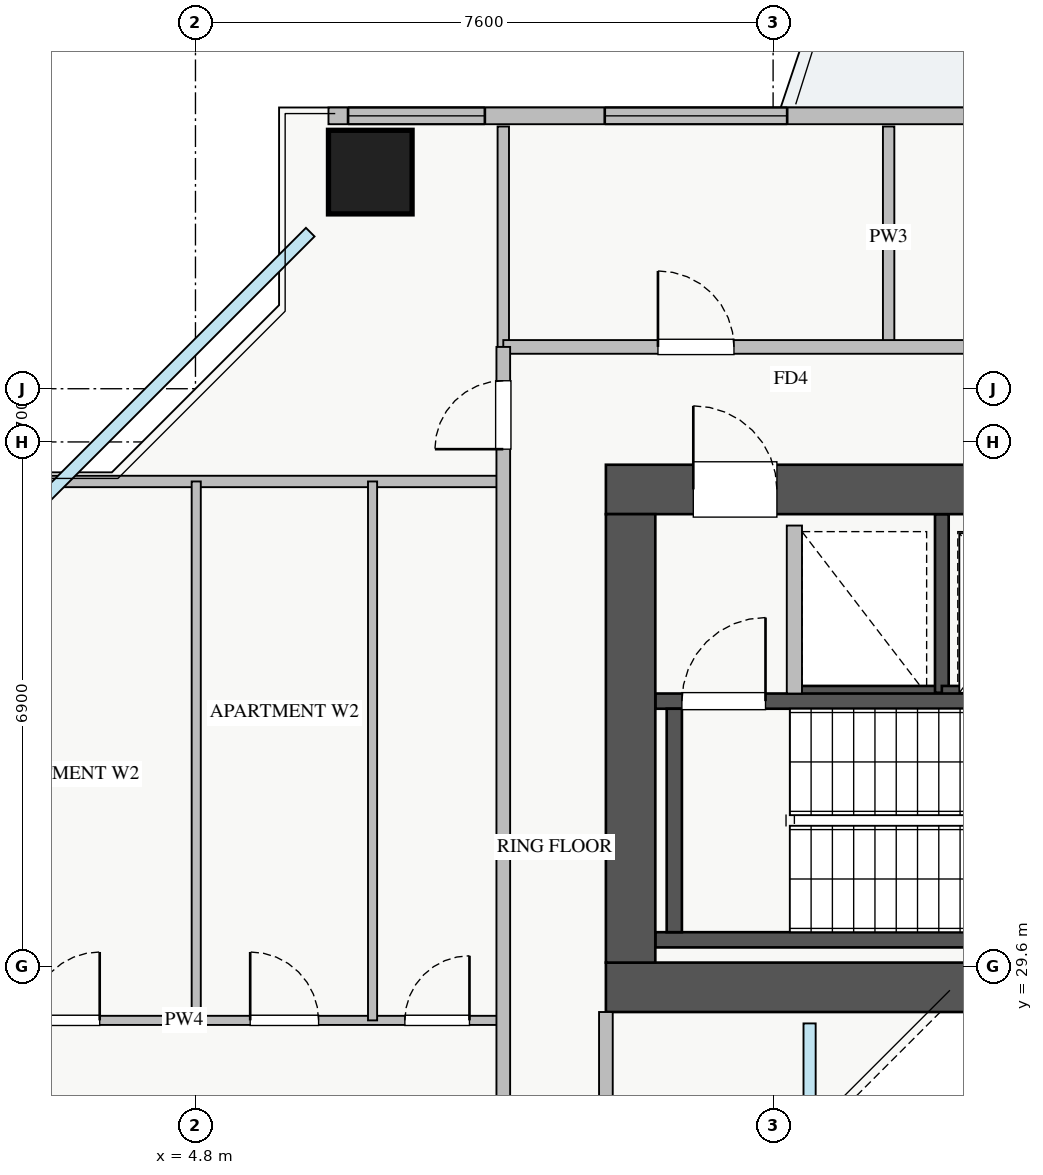
"""IFC4 building model, lengths in metres.
Left out: names, types, materials, properties, quantities, classifications, styles, units other than length and angle.
Written with IfcOpenShell. Run it as: python <this file> out.ifc"""

import sys

from ifc_helpers import new_model, si_unit, direction, frame, frame_2d, origin, origin_2d, place, context, subcontext, project, spatial, rectangle, extrude, source, transform, mapped, element, fill, save


model = new_model("IFC4")
c1 = context("Model", 3, precision=1e-05, world=origin(), true_north=direction((0.0, 1.0)))
c2 = subcontext(c1, "Body", "Model", "MODEL_VIEW")
j1 = project(units=[si_unit("LENGTHUNIT", "METRE"), si_unit("PLANEANGLEUNIT", "RADIAN")], contexts=[c1])
p1 = place(None, origin())
s1 = spatial("IfcSite", under=j1, at=p1, CompositionType="ELEMENT")
p2 = place(p1, origin())
s2 = spatial("IfcBuilding", under=s1, at=p2, CompositionType="ELEMENT")
p3 = place(p2, frame((0.0, 0.0, 119.75)))
s3 = spatial("IfcBuildingStorey", under=s2, at=p3, CompositionType="ELEMENT", Elevation=119.75)
p4 = place(p3, frame((12.68, 33.2, 0.0), z_axis=(0.0, 0.0, 1.0), x_axis=(1.0, 0.0, 0.0)))
e1 = element("IfcWall", 1, at=p4, inside=s3, PredefinedType="SHEAR", context=c2, shape_type="SweptSolid", body=[
    extrude(rectangle(XDim=1.94, YDim=0.18, at=frame_2d((0.97, 0.0))), origin(), (0.0, 0.0, 1.0), 3.07),
])
p5 = place(p3, frame((14.62, 33.2, 0.0), z_axis=(0.0, 0.0, 1.0), x_axis=(0.0, 1.0, 0.0)))
e2 = element("IfcWall", 2, at=p5, inside=s3, PredefinedType="SHEAR", context=c2, shape_type="SweptSolid", body=[
    extrude(rectangle(XDim=2.35, YDim=0.18, at=frame_2d((1.175, 0.0))), origin(), (0.0, 0.0, 1.0), 3.07),
])
p6 = place(p3, frame((14.62, 33.2, 0.0), z_axis=(0.0, 0.0, 1.0), x_axis=(1.0, 0.0, 0.0)))
e3 = element("IfcWall", 3, at=p6, inside=s3, PredefinedType="SHEAR", context=c2, shape_type="SweptSolid", body=[
    extrude(rectangle(XDim=1.96, YDim=0.18, at=frame_2d((0.98, 0.0))), origin(), (0.0, 0.0, 1.0), 3.07),
])
p7 = place(p3, frame((10.85, 29.95, 0.0), z_axis=(0.0, 0.0, 1.0), x_axis=(1.0, 0.0, 0.0)))
e4 = element("IfcWall", 4, at=p7, inside=s3, PredefinedType="SHEAR", context=c2, shape_type="SweptSolid", body=[
    extrude(rectangle(XDim=7.3, YDim=0.2, at=frame_2d((3.65, 0.0))), origin(), (0.0, 0.0, 1.0), 3.25),
])
p8 = place(p3, frame((10.85, 33.09, 0.0), z_axis=(0.0, 0.0, 1.0), x_axis=(1.0, 0.0, 0.0)))
e5 = element("IfcWall", 5, at=p8, inside=s3, PredefinedType="SHEAR", context=c2, shape_type="SweptSolid", body=[
    extrude(rectangle(XDim=7.3, YDim=0.2, at=frame_2d((3.65, 0.0))), origin(), (0.0, 0.0, 1.0), 3.25),
])
p9 = place(p8, frame((0.35, 0.0, 0.0)))
e6 = element("IfcOpeningElement", 6, at=p9, cuts=e5, PredefinedType="OPENING", context=c2, shape_type="SweptSolid", body=[
    extrude(rectangle(XDim=1.1, YDim=2.05, at=frame_2d((0.55, 1.025))), frame((0.0, 0.11, 0.0), z_axis=(0.0, -1.0, 0.0), x_axis=(1.0, 0.0, 0.0)), (0.0, 0.0, 1.0), 0.22),
])
p10 = place(p3, frame((11.1, 30.05, 0.0), z_axis=(0.0, 0.0, 1.0), x_axis=(0.0, 1.0, 0.0)))
e7 = element("IfcWall", 7, at=p10, inside=s3, PredefinedType="SHEAR", context=c2, shape_type="SweptSolid", body=[
    extrude(rectangle(XDim=2.94, YDim=0.2, at=frame_2d((1.47, 0.0))), origin(), (0.0, 0.0, 1.0), 3.25),
])
p11 = place(p3, frame((10.2, 29.325, 0.0), z_axis=(0.0, 0.0, 1.0), x_axis=(1.0, 0.0, 0.0)))
e8 = element("IfcWall", 8, at=p11, inside=s3, PredefinedType="SHEAR", context=c2, shape_type="SweptSolid", body=[
    extrude(rectangle(XDim=17.6, YDim=0.65, at=frame_2d((8.8, 0.0))), origin(), (0.0, 0.0, 1.0), 3.25),
])
p12 = place(p3, frame((10.2, 35.875, 0.0), z_axis=(0.0, 0.0, 1.0), x_axis=(1.0, 0.0, 0.0)))
e9 = element("IfcWall", 9, at=p12, inside=s3, PredefinedType="SHEAR", context=c2, shape_type="SweptSolid", body=[
    extrude(rectangle(XDim=17.6, YDim=0.65, at=frame_2d((8.8, 0.0))), origin(), (0.0, 0.0, 1.0), 3.25),
])
p13 = place(p12, frame((1.15, 0.0, 0.0)))
e10 = element("IfcOpeningElement", 10, at=p13, cuts=e9, PredefinedType="OPENING", context=c2, shape_type="SweptSolid", body=[
    extrude(rectangle(XDim=1.1, YDim=2.05, at=frame_2d((0.55, 1.025))), frame((0.0, 0.335, 0.0), z_axis=(0.0, -1.0, 0.0), x_axis=(1.0, 0.0, 0.0)), (0.0, 0.0, 1.0), 0.67),
])
p14 = place(p12, frame((8.3, 0.0, 0.0)))
e11 = element("IfcOpeningElement", 11, at=p14, cuts=e9, PredefinedType="OPENING", context=c2, shape_type="SweptSolid", body=[
    extrude(rectangle(XDim=1.1, YDim=2.05, at=frame_2d((0.55, 1.025))), frame((0.0, 0.335, 0.0), z_axis=(0.0, -1.0, 0.0), x_axis=(1.0, 0.0, 0.0)), (0.0, 0.0, 1.0), 0.67),
])
p15 = place(p12, frame((4.9, 0.0, 0.0)))
e12 = element("IfcOpeningElement", 12, at=p15, cuts=e9, PredefinedType="OPENING", context=c2, shape_type="SweptSolid", body=[
    extrude(rectangle(XDim=1.1, YDim=2.05, at=frame_2d((0.55, 1.025))), frame((0.0, 0.335, 0.0), z_axis=(0.0, -1.0, 0.0), x_axis=(1.0, 0.0, 0.0)), (0.0, 0.0, 1.0), 0.67),
])
p16 = place(p12, frame((14.74, 0.0, 0.0)))
e13 = element("IfcOpeningElement", 13, at=p16, cuts=e9, PredefinedType="OPENING", context=c2, shape_type="SweptSolid", body=[
    extrude(rectangle(XDim=1.0, YDim=2.05, at=frame_2d((0.5, 1.025))), frame((0.0, 0.335, 0.0), z_axis=(0.0, -1.0, 0.0), x_axis=(1.0, 0.0, 0.0)), (0.0, 0.0, 1.0), 0.67),
])
p17 = place(p12, frame((10.25, 0.0, 0.0)))
e14 = element("IfcOpeningElement", 14, at=p17, cuts=e9, PredefinedType="OPENING", context=c2, shape_type="SweptSolid", body=[
    extrude(rectangle(XDim=1.0, YDim=2.05, at=frame_2d((0.5, 1.025))), frame((0.0, 0.335, 0.0), z_axis=(0.0, -1.0, 0.0), x_axis=(1.0, 0.0, 0.0)), (0.0, 0.0, 1.0), 0.67),
])
p18 = place(p12, frame((12.7, 0.0, 0.0)))
e15 = element("IfcOpeningElement", 15, at=p18, cuts=e9, PredefinedType="OPENING", context=c2, shape_type="SweptSolid", body=[
    extrude(rectangle(XDim=1.0, YDim=2.05, at=frame_2d((0.5, 1.025))), frame((0.0, 0.335, 0.0), z_axis=(0.0, -1.0, 0.0), x_axis=(1.0, 0.0, 0.0)), (0.0, 0.0, 1.0), 0.67),
])
p19 = place(p3, frame((10.525, 29.65, 0.0), z_axis=(0.0, 0.0, 1.0), x_axis=(0.0, 1.0, 0.0)))
e16 = element("IfcWall", 16, at=p19, inside=s3, PredefinedType="SHEAR", context=c2, shape_type="SweptSolid", body=[
    extrude(rectangle(XDim=5.9, YDim=0.65, at=frame_2d((2.95, 0.0))), origin(), (0.0, 0.0, 1.0), 3.25),
])
m1 = source(origin(), c2, "Body", "SweptSolid", [
    extrude(rectangle(XDim=1.1, YDim=1.1, at=origin_2d()), origin(), (0.0, 0.0, 1.0), 3.25),
])
p20 = place(p3, frame((7.1, 40.05, 0.0), z_axis=(0.0, 0.0, 1.0), x_axis=(1.0, 0.0, 0.0)))
e17 = element("IfcColumn", 17, at=p20, inside=s3, PredefinedType="COLUMN", context=c2, shape_type="MappedRepresentation", body=[
    mapped(m1, transform((0.0, 0.0, 0.0), x_axis=(1.0, 0.0, 0.0), y_axis=(0.0, 1.0, 0.0), z_axis=(0.0, 0.0, 1.0), scale=1.0)),
])
p21 = place(p3, frame((6.55, 40.79, 0.0), z_axis=(0.0, 0.0, 1.0), x_axis=(1.0, 0.0, 0.0)))
e18 = element("IfcWall", 18, at=p21, inside=s3, PredefinedType="STANDARD", context=c2, shape_type="SweptSolid", body=[
    extrude(rectangle(XDim=24.9, YDim=0.22, at=frame_2d((12.45, 0.0))), origin(), (0.0, 0.0, 1.0), 2.61),
])
p22 = place(p21, frame((13.3, 0.0, 0.0)))
e19 = element("IfcOpeningElement", 19, at=p22, cuts=e18, PredefinedType="OPENING", context=c2, shape_type="SweptSolid", body=[
    extrude(rectangle(XDim=1.2, YDim=2.1, at=frame_2d((0.6, 1.05))), frame((0.0, 0.12, 0.0), z_axis=(0.0, -1.0, 0.0), x_axis=(1.0, 0.0, 0.0)), (0.0, 0.0, 1.0), 0.24),
])
p23 = place(p21, frame((3.635, 0.0, 0.9)))
e20 = element("IfcOpeningElement", 20, at=p23, cuts=e18, PredefinedType="OPENING", context=c2, shape_type="SweptSolid", body=[
    extrude(rectangle(XDim=2.4, YDim=1.5, at=frame_2d((1.2, 0.75))), frame((0.0, 0.12, 0.0), z_axis=(0.0, -1.0, 0.0), x_axis=(1.0, 0.0, 0.0)), (0.0, 0.0, 1.0), 0.24),
])
p24 = place(p21, frame((8.438, 0.0, 0.9)))
e21 = element("IfcOpeningElement", 21, at=p24, cuts=e18, PredefinedType="OPENING", context=c2, shape_type="SweptSolid", body=[
    extrude(rectangle(XDim=1.8, YDim=1.45, at=frame_2d((0.9, 0.725))), frame((0.0, 0.12, 0.0), z_axis=(0.0, -1.0, 0.0), x_axis=(1.0, 0.0, 0.0)), (0.0, 0.0, 1.0), 0.24),
])
p25 = place(p21, frame((14.813, 0.0, 0.9)))
e22 = element("IfcOpeningElement", 22, at=p25, cuts=e18, PredefinedType="OPENING", context=c2, shape_type="SweptSolid", body=[
    extrude(rectangle(XDim=1.5, YDim=1.45, at=frame_2d((0.75, 0.725))), frame((0.0, 0.12, 0.0), z_axis=(0.0, -1.0, 0.0), x_axis=(1.0, 0.0, 0.0)), (0.0, 0.0, 1.0), 0.24),
])
p26 = place(p21, frame((20.738, 0.0, 0.9)))
e23 = element("IfcOpeningElement", 23, at=p26, cuts=e18, PredefinedType="OPENING", context=c2, shape_type="SweptSolid", body=[
    extrude(rectangle(XDim=2.1, YDim=1.48, at=frame_2d((1.05, 0.74))), frame((0.0, 0.12, 0.0), z_axis=(0.0, -1.0, 0.0), x_axis=(1.0, 0.0, 0.0)), (0.0, 0.0, 1.0), 0.24),
])
p27 = place(p21, frame((0.258, 0.0, 0.9)))
e24 = element("IfcOpeningElement", 24, at=p27, cuts=e18, PredefinedType="OPENING", context=c2, shape_type="SweptSolid", body=[
    extrude(rectangle(XDim=1.8, YDim=1.5, at=frame_2d((0.9, 0.75))), frame((0.0, 0.12, 0.0), z_axis=(0.0, -1.0, 0.0), x_axis=(1.0, 0.0, 0.0)), (0.0, 0.0, 1.0), 0.24),
])
p28 = place(p3, frame((12.68, 33.19, 0.0), z_axis=(0.0, 0.0, 1.0), x_axis=(0.0, 1.0, 0.0)))
e25 = element("IfcWall", 25, at=p28, inside=s3, PredefinedType="PARTITIONING", context=c2, shape_type="SweptSolid", body=[
    extrude(rectangle(XDim=2.21, YDim=0.2, at=frame_2d((1.105, 0.0))), origin(), (0.0, 0.0, 1.0), 3.07),
])
for number, where, z_axis, x_axis in (
    (26, (13.92, 37.75, 0.0), (0.0, 0.0, 1.0), (0.0, 1.0, 0.0)),
    (27, (8.85, 37.75, 0.0), (0.0, 0.0, 1.0), (0.0, 1.0, 0.0)),
):
    element("IfcWall", number, at=place(p3, frame(where, z_axis=z_axis, x_axis=x_axis)), inside=s3, PredefinedType="PARTITIONING", context=c2, shape_type="SweptSolid", body=[
        extrude(rectangle(XDim=2.9, YDim=0.15, at=frame_2d((1.45, 0.0))), origin(), (0.0, 0.0, 1.0), 3.07),
    ])
p29 = place(p3, frame((8.85, 37.75, 0.0), z_axis=(0.0, 0.0, 1.0), x_axis=(1.0, 0.0, 0.0)))
e28 = element("IfcWall", 28, at=p29, inside=s3, PredefinedType="PARTITIONING", context=c2, shape_type="SweptSolid", body=[
    extrude(rectangle(XDim=23.57, YDim=0.18, at=frame_2d((11.785, 0.0))), origin(), (0.0, 0.0, 1.0), 3.07),
])
p30 = place(p29, frame((2.035, 0.0, 0.0)))
e29 = element("IfcOpeningElement", 29, at=p30, cuts=e28, PredefinedType="OPENING", context=c2, shape_type="SweptSolid", body=[
    extrude(rectangle(XDim=1.0, YDim=2.05, at=frame_2d((0.5, 1.025))), frame((0.0, 0.1, 0.0), z_axis=(0.0, -1.0, 0.0), x_axis=(1.0, 0.0, 0.0)), (0.0, 0.0, 1.0), 0.2),
])
p31 = place(p29, frame((7.16, 0.0, 0.0)))
e30 = element("IfcOpeningElement", 30, at=p31, cuts=e28, PredefinedType="OPENING", context=c2, shape_type="SweptSolid", body=[
    extrude(rectangle(XDim=1.0, YDim=2.05, at=frame_2d((0.5, 1.025))), frame((0.0, 0.1, 0.0), z_axis=(0.0, -1.0, 0.0), x_axis=(1.0, 0.0, 0.0)), (0.0, 0.0, 1.0), 0.2),
])
p32 = place(p29, frame((13.3, 0.0, 0.0)))
e31 = element("IfcOpeningElement", 31, at=p32, cuts=e28, PredefinedType="OPENING", context=c2, shape_type="SweptSolid", body=[
    extrude(rectangle(XDim=1.0, YDim=2.05, at=frame_2d((0.5, 1.025))), frame((0.0, 0.1, 0.0), z_axis=(0.0, -1.0, 0.0), x_axis=(1.0, 0.0, 0.0)), (0.0, 0.0, 1.0), 0.2),
])
p33 = place(p29, frame((19.74, 0.0, 0.0)))
e32 = element("IfcOpeningElement", 32, at=p33, cuts=e28, PredefinedType="OPENING", context=c2, shape_type="SweptSolid", body=[
    extrude(rectangle(XDim=1.0, YDim=2.05, at=frame_2d((0.5, 1.025))), frame((0.0, 0.1, 0.0), z_axis=(0.0, -1.0, 0.0), x_axis=(1.0, 0.0, 0.0)), (0.0, 0.0, 1.0), 0.2),
])
p34 = place(p3, frame((1.35, 35.98, 0.0), z_axis=(0.0, 0.0, 1.0), x_axis=(1.0, 0.0, 0.0)))
e33 = element("IfcWall", 33, at=p34, inside=s3, PredefinedType="PARTITIONING", context=c2, shape_type="SweptSolid", body=[
    extrude(rectangle(XDim=7.5, YDim=0.15, at=frame_2d((3.75, 0.0))), origin(), (0.0, 0.0, 1.0), 3.07),
])
p35 = place(p3, frame((1.35, 28.89, 0.0), z_axis=(0.0, 0.0, 1.0), x_axis=(1.0, 0.0, 0.0)))
e34 = element("IfcWall", 34, at=p35, inside=s3, PredefinedType="PLUMBINGWALL", context=c2, shape_type="SweptSolid", body=[
    extrude(rectangle(XDim=7.5, YDim=0.12, at=frame_2d((3.75, 0.0))), origin(), (0.0, 0.0, 1.0), 3.07),
])
p36 = place(p35, frame((1.29, 0.0, 0.0)))
e35 = element("IfcOpeningElement", 35, at=p36, cuts=e34, PredefinedType="OPENING", context=c2, shape_type="SweptSolid", body=[
    extrude(rectangle(XDim=0.9, YDim=2.05, at=frame_2d((0.45, 1.025))), frame((0.0, 0.07, 0.0), z_axis=(0.0, -1.0, 0.0), x_axis=(1.0, 0.0, 0.0)), (0.0, 0.0, 1.0), 0.14),
])
p37 = place(p35, frame((4.17, 0.0, 0.0)))
e36 = element("IfcOpeningElement", 36, at=p37, cuts=e34, PredefinedType="OPENING", context=c2, shape_type="SweptSolid", body=[
    extrude(rectangle(XDim=0.9, YDim=2.05, at=frame_2d((0.45, 1.025))), frame((0.0, 0.07, 0.0), z_axis=(0.0, -1.0, 0.0), x_axis=(1.0, 0.0, 0.0)), (0.0, 0.0, 1.0), 0.14),
])
p38 = place(p35, frame((6.205, 0.0, 0.0)))
e37 = element("IfcOpeningElement", 37, at=p38, cuts=e34, PredefinedType="OPENING", context=c2, shape_type="SweptSolid", body=[
    extrude(rectangle(XDim=0.85, YDim=2.05, at=frame_2d((0.425, 1.025))), frame((0.0, 0.07, 0.0), z_axis=(0.0, -1.0, 0.0), x_axis=(1.0, 0.0, 0.0)), (0.0, 0.0, 1.0), 0.14),
])
p39 = place(p3, frame((4.81, 28.89, 0.0), z_axis=(0.0, 0.0, 1.0), x_axis=(0.0, 1.0, 0.0)))
e38 = element("IfcWall", 38, at=p39, inside=s3, PredefinedType="PLUMBINGWALL", context=c2, shape_type="SweptSolid", body=[
    extrude(rectangle(XDim=7.09, YDim=0.12, at=frame_2d((3.545, 0.0))), origin(), (0.0, 0.0, 1.0), 3.07),
])
p40 = place(p3, frame((7.13, 28.89, 0.0), z_axis=(0.0, 0.0, 1.0), x_axis=(0.0, 1.0, 0.0)))
e39 = element("IfcWall", 39, at=p40, inside=s3, PredefinedType="PLUMBINGWALL", context=c2, shape_type="SweptSolid", body=[
    extrude(rectangle(XDim=7.09, YDim=0.12, at=frame_2d((3.545, 0.0))), origin(), (0.0, 0.0, 1.0), 2.577),
])
p41 = place(p3, frame((8.85, 8.25, 0.0), z_axis=(0.0, 0.0, 1.0), x_axis=(0.0, 1.0, 0.0)))
e40 = element("IfcWall", 40, at=p41, inside=s3, PredefinedType="PARTITIONING", context=c2, shape_type="SweptSolid", body=[
    extrude(rectangle(XDim=29.5, YDim=0.18, at=frame_2d((14.75, 0.0))), origin(), (0.0, 0.0, 1.0), 3.07),
])
p42 = place(p41, frame((28.155, 0.0, 0.0)))
e41 = element("IfcOpeningElement", 41, at=p42, cuts=e40, PredefinedType="OPENING", context=c2, shape_type="SweptSolid", body=[
    extrude(rectangle(XDim=0.9, YDim=2.05, at=frame_2d((0.45, 1.025))), frame((0.0, 0.1, 0.0), z_axis=(0.0, -1.0, 0.0), x_axis=(1.0, 0.0, 0.0)), (0.0, 0.0, 1.0), 0.2),
])
p43 = place(p41, frame((0.27, 0.0, 0.0)))
e42 = element("IfcOpeningElement", 42, at=p43, cuts=e40, PredefinedType="OPENING", context=c2, shape_type="SweptSolid", body=[
    extrude(rectangle(XDim=0.9, YDim=2.05, at=frame_2d((0.45, 1.025))), frame((0.0, 0.1, 0.0), z_axis=(0.0, -1.0, 0.0), x_axis=(1.0, 0.0, 0.0)), (0.0, 0.0, 1.0), 0.2),
])
p44 = place(p41, frame((7.255, 0.0, 0.0)))
e43 = element("IfcOpeningElement", 43, at=p44, cuts=e40, PredefinedType="OPENING", context=c2, shape_type="SweptSolid", body=[
    extrude(rectangle(XDim=1.0, YDim=2.05, at=frame_2d((0.5, 1.025))), frame((0.0, 0.1, 0.0), z_axis=(0.0, -1.0, 0.0), x_axis=(1.0, 0.0, 0.0)), (0.0, 0.0, 1.0), 0.2),
])
p45 = place(p41, frame((16.675, 0.0, 0.0)))
e44 = element("IfcOpeningElement", 44, at=p45, cuts=e40, PredefinedType="OPENING", context=c2, shape_type="SweptSolid", body=[
    extrude(rectangle(XDim=1.0, YDim=2.05, at=frame_2d((0.5, 1.025))), frame((0.0, 0.1, 0.0), z_axis=(0.0, -1.0, 0.0), x_axis=(1.0, 0.0, 0.0)), (0.0, 0.0, 1.0), 0.2),
])
p46 = place(p3, frame((10.2, 17.0, 0.0), z_axis=(0.0, 0.0, 1.0), x_axis=(0.0, 1.0, 0.0)))
e45 = element("IfcWall", 45, at=p46, inside=s3, PredefinedType="PARTITIONING", context=c2, shape_type="SweptSolid", body=[
    extrude(rectangle(XDim=12.0, YDim=0.18, at=frame_2d((6.0, 0.0))), origin(), (0.0, 0.0, 1.0), 3.07),
])
p47 = place(p46, frame((1.5, 0.0, 0.0)))
e46 = element("IfcOpeningElement", 46, at=p47, cuts=e45, PredefinedType="OPENING", context=c2, shape_type="SweptSolid", body=[
    extrude(rectangle(XDim=0.85, YDim=2.05, at=frame_2d((0.425, 1.025))), frame((0.0, 0.1, 0.0), z_axis=(0.0, -1.0, 0.0), x_axis=(1.0, 0.0, 0.0)), (0.0, 0.0, 1.0), 0.2),
])
p48 = place(p46, frame((6.5, 0.0, 0.0)))
e47 = element("IfcOpeningElement", 47, at=p48, cuts=e45, PredefinedType="OPENING", context=c2, shape_type="SweptSolid", body=[
    extrude(rectangle(XDim=1.0, YDim=2.05, at=frame_2d((0.5, 1.025))), frame((0.0, 0.1, 0.0), z_axis=(0.0, -1.0, 0.0), x_axis=(1.0, 0.0, 0.0)), (0.0, 0.0, 1.0), 0.2),
])
m2 = source(origin(), c2, "Body", "SweptSolid", [
    extrude(rectangle(XDim=2.4, YDim=1.5, at=frame_2d((1.2, 0.75))), frame((0.0, 0.03, 0.0), z_axis=(0.0, -1.0, 0.0), x_axis=(1.0, 0.0, 0.0)), (0.0, 0.0, 1.0), 0.06),
])
p49 = place(p23, origin())
e48 = element("IfcWindow", 48, at=p49, inside=s3, PartitioningType="TRIPLE_PANEL_VERTICAL", PredefinedType="WINDOW", context=c2, shape_type="MappedRepresentation", body=[
    mapped(m2, transform((0.0, 0.0, 0.0), x_axis=(1.0, 0.0, 0.0), y_axis=(0.0, 1.0, 0.0), z_axis=(0.0, 0.0, 1.0), scale=1.0)),
])
fill(e20, e48)
m3 = source(origin(), c2, "Body", "SweptSolid", [
    extrude(rectangle(XDim=1.1, YDim=2.05, at=frame_2d((0.55, 1.025))), frame((0.0, 0.025, 0.0), z_axis=(0.0, -1.0, 0.0), x_axis=(1.0, 0.0, 0.0)), (0.0, 0.0, 1.0), 0.05),
])
p50 = place(p13, origin())
e49 = element("IfcDoor", 49, at=p50, inside=s3, OperationType="SINGLE_SWING_LEFT", PredefinedType="DOOR", context=c2, shape_type="MappedRepresentation", body=[
    mapped(m3, transform((0.0, 0.0, 0.0), x_axis=(1.0, 0.0, 0.0), y_axis=(0.0, 1.0, 0.0), z_axis=(0.0, 0.0, 1.0), scale=1.0)),
])
fill(e10, e49)
p51 = place(p9, origin())
e50 = element("IfcDoor", 50, at=p51, inside=s3, OperationType="SINGLE_SWING_RIGHT", PredefinedType="DOOR", context=c2, shape_type="MappedRepresentation", body=[
    mapped(m3, transform((0.0, 0.0, 0.0), x_axis=(1.0, 0.0, 0.0), y_axis=(0.0, 1.0, 0.0), z_axis=(0.0, 0.0, 1.0), scale=1.0)),
])
fill(e6, e50)
m4 = source(origin(), c2, "Body", "SweptSolid", [
    extrude(rectangle(XDim=1.0, YDim=2.05, at=frame_2d((0.5, 1.025))), frame((0.0, 0.025, 0.0), z_axis=(0.0, -1.0, 0.0), x_axis=(1.0, 0.0, 0.0)), (0.0, 0.0, 1.0), 0.05),
])
p52 = place(p30, origin())
e51 = element("IfcDoor", 51, at=p52, inside=s3, OperationType="SINGLE_SWING_LEFT", PredefinedType="DOOR", context=c2, shape_type="MappedRepresentation", body=[
    mapped(m4, transform((0.0, 0.0, 0.0), x_axis=(1.0, 0.0, 0.0), y_axis=(0.0, 1.0, 0.0), z_axis=(0.0, 0.0, 1.0), scale=1.0)),
])
fill(e29, e51)
m5 = source(origin(), c2, "Body", "SweptSolid", [
    extrude(rectangle(XDim=0.9, YDim=2.05, at=frame_2d((0.45, 1.025))), frame((0.0, 0.025, 0.0), z_axis=(0.0, -1.0, 0.0), x_axis=(1.0, 0.0, 0.0)), (0.0, 0.0, 1.0), 0.05),
])
p53 = place(p36, origin())
e52 = element("IfcDoor", 52, at=p53, inside=s3, OperationType="SINGLE_SWING_RIGHT", PredefinedType="DOOR", context=c2, shape_type="MappedRepresentation", body=[
    mapped(m5, transform((0.0, 0.0, 0.0), x_axis=(1.0, 0.0, 0.0), y_axis=(0.0, 1.0, 0.0), z_axis=(0.0, 0.0, 1.0), scale=1.0)),
])
fill(e35, e52)
p54 = place(p37, origin())
e53 = element("IfcDoor", 53, at=p54, inside=s3, OperationType="SINGLE_SWING_LEFT", PredefinedType="DOOR", context=c2, shape_type="MappedRepresentation", body=[
    mapped(m5, transform((0.0, 0.0, 0.0), x_axis=(1.0, 0.0, 0.0), y_axis=(0.0, 1.0, 0.0), z_axis=(0.0, 0.0, 1.0), scale=1.0)),
])
fill(e36, e53)
m6 = source(origin(), c2, "Body", "SweptSolid", [
    extrude(rectangle(XDim=0.85, YDim=2.05, at=frame_2d((0.425, 1.025))), frame((0.0, 0.025, 0.0), z_axis=(0.0, -1.0, 0.0), x_axis=(1.0, 0.0, 0.0)), (0.0, 0.0, 1.0), 0.05),
])
p55 = place(p38, origin())
e54 = element("IfcDoor", 54, at=p55, inside=s3, OperationType="SINGLE_SWING_RIGHT", PredefinedType="DOOR", context=c2, shape_type="MappedRepresentation", body=[
    mapped(m6, transform((0.0, 0.0, 0.0), x_axis=(1.0, 0.0, 0.0), y_axis=(0.0, 1.0, 0.0), z_axis=(0.0, 0.0, 1.0), scale=1.0)),
])
fill(e37, e54)
p56 = place(p42, origin())
e55 = element("IfcDoor", 55, at=p56, inside=s3, OperationType="SINGLE_SWING_LEFT", PredefinedType="DOOR", context=c2, shape_type="MappedRepresentation", body=[
    mapped(m5, transform((0.0, 0.0, 0.0), x_axis=(1.0, 0.0, 0.0), y_axis=(0.0, 1.0, 0.0), z_axis=(0.0, 0.0, 1.0), scale=1.0)),
])
fill(e41, e55)
m7 = source(origin(), c2, "Body", "SweptSolid", [
    extrude(rectangle(XDim=1.8, YDim=1.5, at=frame_2d((0.9, 0.75))), frame((0.0, 0.03, 0.0), z_axis=(0.0, -1.0, 0.0), x_axis=(1.0, 0.0, 0.0)), (0.0, 0.0, 1.0), 0.06),
])
p57 = place(p27, origin())
e56 = element("IfcWindow", 56, at=p57, inside=s3, PartitioningType="DOUBLE_PANEL_VERTICAL", PredefinedType="WINDOW", context=c2, shape_type="MappedRepresentation", body=[
    mapped(m7, transform((0.0, 0.0, 0.0), x_axis=(1.0, 0.0, 0.0), y_axis=(0.0, 1.0, 0.0), z_axis=(0.0, 0.0, 1.0), scale=1.0)),
])
fill(e24, e56)
save(model, sys.argv[1])
